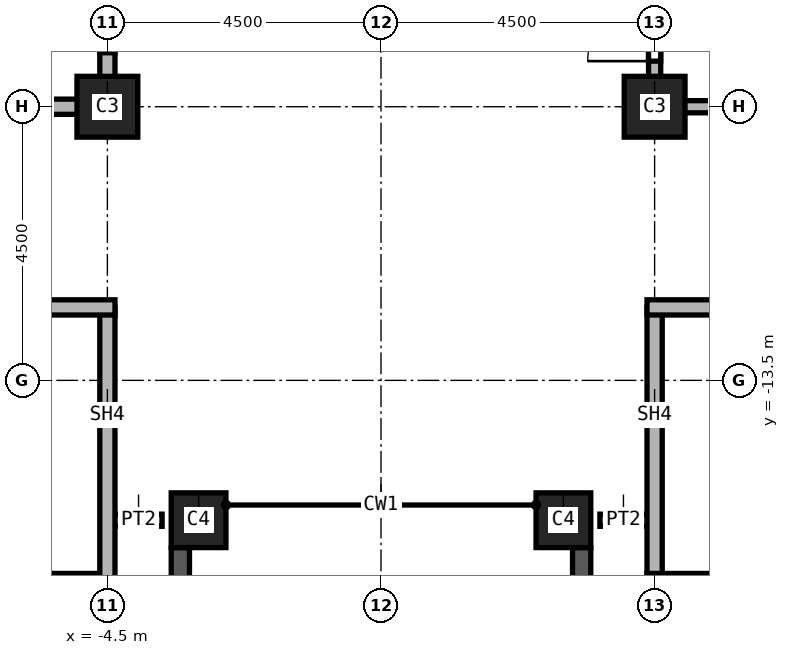
"""IFC4 building model, lengths in metres.
Left out: names, types, materials, properties, quantities, classifications, styles, units other than length and angle.
Written with IfcOpenShell. Run it as: python <this file> out.ifc"""

import sys

from ifc_helpers import new_model, si_unit, direction, frame, frame_2d, origin, origin_2d, place, context, subcontext, project, spatial, rectangle, extrude, element, fill, save


model = new_model("IFC4")
c1 = context("Model", 3, precision=1e-05, world=origin(), true_north=direction((0.0, 1.0)))
c2 = subcontext(c1, "Body", "Model", "MODEL_VIEW")
j1 = project(units=[si_unit("LENGTHUNIT", "METRE"), si_unit("PLANEANGLEUNIT", "RADIAN")], contexts=[c1])
p1 = place(None, origin())
s1 = spatial("IfcSite", under=j1, at=p1, CompositionType="ELEMENT")
p2 = place(p1, origin())
s2 = spatial("IfcBuilding", under=s1, at=p2, CompositionType="ELEMENT")
p3 = place(p2, frame((0.0, 0.0, 108.0)))
s3 = spatial("IfcBuildingStorey", under=s2, at=p3, CompositionType="ELEMENT", Elevation=108.0)
for number, where, z_axis, x_axis in (
    (1, (4.5, -9.0, 0.0), (0.0, 0.0, 1.0), (1.0, 0.0, 0.0)),
    (2, (-4.5, -9.0, 0.0), (0.0, 0.0, 1.0), (1.0, 0.0, 0.0)),
):
    element("IfcColumn", number, at=place(p3, frame(where, z_axis=z_axis, x_axis=x_axis)), inside=s3, PredefinedType="COLUMN", context=c2, shape_type="SweptSolid", body=[
        extrude(rectangle(XDim=1.0, YDim=1.0, at=origin_2d()), origin(), (0.0, 0.0, 1.0), 3.7),
    ])
for number, where, z_axis, x_axis in (
    (3, (3.0, -15.8, 0.0), (0.0, 0.0, 1.0), (1.0, 0.0, 0.0)),
    (4, (-3.0, -15.8, 0.0), (0.0, 0.0, 1.0), (1.0, 0.0, 0.0)),
):
    element("IfcColumn", number, at=place(p3, frame(where, z_axis=z_axis, x_axis=x_axis)), inside=s3, PredefinedType="COLUMN", context=c2, shape_type="SweptSolid", body=[
        extrude(rectangle(XDim=0.9, YDim=0.9, at=origin_2d()), origin(), (0.0, 0.0, 1.0), 3.7),
    ])
p4 = place(p3, frame((-3.3, -24.2, 0.0), z_axis=(0.0, 0.0, 1.0), x_axis=(0.0, 1.0, 0.0)))
e5 = element("IfcWall", 5, at=p4, inside=s3, PredefinedType="SOLIDWALL", context=c2, shape_type="SweptSolid", body=[
    extrude(rectangle(XDim=7.95, YDim=0.3, at=frame_2d((3.975, 0.0))), origin(), (0.0, 0.0, 1.0), 3.1),
])
p5 = place(p4, frame((0.788, 0.0, 0.8)))
e6 = element("IfcOpeningElement", 6, at=p5, cuts=e5, PredefinedType="OPENING", context=c2, shape_type="SweptSolid", body=[
    extrude(rectangle(XDim=2.4, YDim=1.95, at=frame_2d((1.2, 0.975))), frame((0.0, 0.15, 0.0), z_axis=(0.0, -1.0, 0.0), x_axis=(1.0, 0.0, 0.0)), (0.0, 0.0, 1.0), 0.3),
])
p6 = place(p4, frame((4.762, 0.0, 0.8)))
e7 = element("IfcOpeningElement", 7, at=p6, cuts=e5, PredefinedType="OPENING", context=c2, shape_type="SweptSolid", body=[
    extrude(rectangle(XDim=2.4, YDim=1.95, at=frame_2d((1.2, 0.975))), frame((0.0, 0.15, 0.0), z_axis=(0.0, -1.0, 0.0), x_axis=(1.0, 0.0, 0.0)), (0.0, 0.0, 1.0), 0.3),
])
p7 = place(p3, frame((3.3, -16.25, 0.0), z_axis=(0.0, 0.0, 1.0), x_axis=(0.0, -1.0, 0.0)))
e8 = element("IfcWall", 8, at=p7, inside=s3, PredefinedType="SOLIDWALL", context=c2, shape_type="SweptSolid", body=[
    extrude(rectangle(XDim=7.95, YDim=0.3, at=frame_2d((3.975, 0.0))), origin(), (0.0, 0.0, 1.0), 3.1),
])
p8 = place(p7, frame((0.788, 0.0, 0.8)))
e9 = element("IfcOpeningElement", 9, at=p8, cuts=e8, PredefinedType="OPENING", context=c2, shape_type="SweptSolid", body=[
    extrude(rectangle(XDim=2.4, YDim=1.95, at=frame_2d((1.2, 0.975))), frame((0.0, 0.15, 0.0), z_axis=(0.0, -1.0, 0.0), x_axis=(1.0, 0.0, 0.0)), (0.0, 0.0, 1.0), 0.3),
])
p9 = place(p7, frame((4.762, 0.0, 0.8)))
e10 = element("IfcOpeningElement", 10, at=p9, cuts=e8, PredefinedType="OPENING", context=c2, shape_type="SweptSolid", body=[
    extrude(rectangle(XDim=2.4, YDim=1.95, at=frame_2d((1.2, 0.975))), frame((0.0, 0.15, 0.0), z_axis=(0.0, -1.0, 0.0), x_axis=(1.0, 0.0, 0.0)), (0.0, 0.0, 1.0), 0.3),
])
for number, where, z_axis, x_axis in (
    (11, (-3.6, -15.8, 0.0), (0.0, 0.0, 1.0), (-1.0, 0.0, 0.0)),
    (12, (4.5, -15.8, 0.0), (0.0, 0.0, 1.0), (-1.0, 0.0, 0.0)),
):
    element("IfcWall", number, at=place(p3, frame(where, z_axis=z_axis, x_axis=x_axis)), inside=s3, PredefinedType="PARTITIONING", context=c2, shape_type="SweptSolid", body=[
        extrude(rectangle(XDim=0.9, YDim=0.2, at=frame_2d((0.45, 0.0))), origin(), (0.0, 0.0, 1.0), 3.7),
    ])
p10 = place(p3, frame((4.5, -9.1, 0.0), z_axis=(0.0, 0.0, 1.0), x_axis=(0.0, 1.0, 0.0)))
e13 = element("IfcWall", 13, at=p10, inside=s3, PredefinedType="SOLIDWALL", context=c2, shape_type="SweptSolid", body=[
    extrude(rectangle(XDim=9.1, YDim=0.2, at=frame_2d((4.55, 0.0))), origin(), (0.0, 0.0, 1.0), 2.938),
])
p11 = place(p10, frame((0.85, 0.0, 0.0)))
e14 = element("IfcOpeningElement", 14, at=p11, cuts=e13, PredefinedType="OPENING", context=c2, shape_type="SweptSolid", body=[
    extrude(rectangle(XDim=1.1, YDim=2.1, at=frame_2d((0.55, 1.05))), frame((0.0, 0.1, 0.0), z_axis=(0.0, -1.0, 0.0), x_axis=(1.0, 0.0, 0.0)), (0.0, 0.0, 1.0), 0.2),
])
p12 = place(p10, frame((3.35, 0.0, 0.0)))
e15 = element("IfcOpeningElement", 15, at=p12, cuts=e13, PredefinedType="OPENING", context=c2, shape_type="SweptSolid", body=[
    extrude(rectangle(XDim=1.1, YDim=2.1, at=frame_2d((0.55, 1.05))), frame((0.0, 0.1, 0.0), z_axis=(0.0, -1.0, 0.0), x_axis=(1.0, 0.0, 0.0)), (0.0, 0.0, 1.0), 0.2),
])
p13 = place(p3, frame((7.5, -9.0, 0.0), z_axis=(0.0, 0.0, 1.0), x_axis=(-1.0, 0.0, 0.0)))
e16 = element("IfcWall", 16, at=p13, inside=s3, PredefinedType="SOLIDWALL", context=c2, shape_type="SweptSolid", body=[
    extrude(rectangle(XDim=3.0, YDim=0.2, at=frame_2d((1.5, 0.0))), origin(), (0.0, 0.0, 1.0), 2.938),
])
p14 = place(p3, frame((-4.5, -9.0, 0.0), z_axis=(0.0, 0.0, 1.0), x_axis=(-1.0, 0.0, 0.0)))
e17 = element("IfcWall", 17, at=p14, inside=s3, PredefinedType="SOLIDWALL", context=c2, shape_type="SweptSolid", body=[
    extrude(rectangle(XDim=3.0, YDim=0.25, at=frame_2d((1.5, 0.0))), origin(), (0.0, 0.0, 1.0), 2.938),
])
p15 = place(p3, frame((-4.5, 0.0, 0.0), z_axis=(0.0, 0.0, 1.0), x_axis=(0.0, -1.0, 0.0)))
e18 = element("IfcWall", 18, at=p15, inside=s3, PredefinedType="SOLIDWALL", context=c2, shape_type="SweptSolid", body=[
    extrude(rectangle(XDim=9.125, YDim=0.25, at=frame_2d((4.562, 0.0))), origin(), (0.0, 0.0, 1.0), 2.938),
])
p16 = place(p15, frame((7.012, 0.0, 0.0)))
e19 = element("IfcOpeningElement", 19, at=p16, cuts=e18, PredefinedType="OPENING", context=c2, shape_type="SweptSolid", body=[
    extrude(rectangle(XDim=1.1, YDim=2.1, at=frame_2d((0.55, 1.05))), frame((0.0, 0.125, 0.0), z_axis=(0.0, -1.0, 0.0), x_axis=(1.0, 0.0, 0.0)), (0.0, 0.0, 1.0), 0.25),
])
p17 = place(p15, frame((3.95, 0.0, 0.0)))
e20 = element("IfcOpeningElement", 20, at=p17, cuts=e18, PredefinedType="OPENING", context=c2, shape_type="SweptSolid", body=[
    extrude(rectangle(XDim=1.1, YDim=2.1, at=frame_2d((0.55, 1.05))), frame((0.0, 0.125, 0.0), z_axis=(0.0, -1.0, 0.0), x_axis=(1.0, 0.0, 0.0)), (0.0, 0.0, 1.0), 0.25),
])
p18 = place(p15, frame((0.95, 0.0, 0.0)))
e21 = element("IfcOpeningElement", 21, at=p18, cuts=e18, PredefinedType="OPENING", context=c2, shape_type="SweptSolid", body=[
    extrude(rectangle(XDim=1.1, YDim=2.1, at=frame_2d((0.55, 1.05))), frame((0.0, 0.125, 0.0), z_axis=(0.0, -1.0, 0.0), x_axis=(1.0, 0.0, 0.0)), (0.0, 0.0, 1.0), 0.25),
])
p19 = place(p3, frame((-4.5, -16.8, 0.0), z_axis=(0.0, 0.0, 1.0), x_axis=(-1.0, 0.0, 0.0)))
e22 = element("IfcWall", 22, at=p19, inside=s3, PredefinedType="SOLIDWALL", context=c2, shape_type="SweptSolid", body=[
    extrude(rectangle(XDim=9.0, YDim=0.25, at=frame_2d((4.5, 0.0))), origin(), (0.0, 0.0, 1.0), 3.7),
])
p20 = place(p3, frame((-4.5, -12.3, 0.0), z_axis=(0.0, 0.0, 1.0), x_axis=(0.0, -1.0, 0.0)))
e23 = element("IfcWall", 23, at=p20, inside=s3, PredefinedType="SOLIDWALL", context=c2, shape_type="SweptSolid", body=[
    extrude(rectangle(XDim=4.625, YDim=0.25, at=frame_2d((2.312, 0.0))), origin(), (0.0, 0.0, 1.0), 3.7),
])
p21 = place(p3, frame((-4.375, -12.3, 0.0), z_axis=(0.0, 0.0, 1.0), x_axis=(-1.0, 0.0, 0.0)))
e24 = element("IfcWall", 24, at=p21, inside=s3, PredefinedType="SOLIDWALL", context=c2, shape_type="SweptSolid", body=[
    extrude(rectangle(XDim=9.125, YDim=0.25, at=frame_2d((4.562, 0.0))), origin(), (0.0, 0.0, 1.0), 3.7),
])
p22 = place(p21, frame((7.2, 0.0, 0.0)))
e25 = element("IfcOpeningElement", 25, at=p22, cuts=e24, PredefinedType="OPENING", context=c2, shape_type="SweptSolid", body=[
    extrude(rectangle(XDim=1.2, YDim=2.1, at=frame_2d((0.6, 1.05))), frame((0.0, 0.125, 0.0), z_axis=(0.0, -1.0, 0.0), x_axis=(1.0, 0.0, 0.0)), (0.0, 0.0, 1.0), 0.25),
])
p23 = place(p3, frame((4.5, -16.8, 0.0), z_axis=(0.0, 0.0, 1.0), x_axis=(0.0, 1.0, 0.0)))
e26 = element("IfcWall", 26, at=p23, inside=s3, PredefinedType="SOLIDWALL", context=c2, shape_type="SweptSolid", body=[
    extrude(rectangle(XDim=4.5, YDim=0.25, at=frame_2d((2.25, 0.0))), origin(), (0.0, 0.0, 1.0), 3.7),
])
p24 = place(p3, frame((13.5, -16.8, 0.0), z_axis=(0.0, 0.0, 1.0), x_axis=(-1.0, 0.0, 0.0)))
e27 = element("IfcWall", 27, at=p24, inside=s3, PredefinedType="SOLIDWALL", context=c2, shape_type="SweptSolid", body=[
    extrude(rectangle(XDim=9.125, YDim=0.25, at=frame_2d((4.562, 0.0))), origin(), (0.0, 0.0, 1.0), 3.7),
])
p25 = place(p3, frame((13.5, -12.3, 0.0), z_axis=(0.0, 0.0, 1.0), x_axis=(-1.0, 0.0, 0.0)))
e28 = element("IfcWall", 28, at=p25, inside=s3, PredefinedType="SOLIDWALL", context=c2, shape_type="SweptSolid", body=[
    extrude(rectangle(XDim=9.125, YDim=0.25, at=frame_2d((4.562, 0.0))), origin(), (0.0, 0.0, 1.0), 3.7),
])
p26 = place(p25, frame((0.6, 0.0, 0.0)))
e29 = element("IfcOpeningElement", 29, at=p26, cuts=e28, PredefinedType="OPENING", context=c2, shape_type="SweptSolid", body=[
    extrude(rectangle(XDim=1.2, YDim=2.1, at=frame_2d((0.6, 1.05))), frame((0.0, 0.125, 0.0), z_axis=(0.0, -1.0, 0.0), x_axis=(1.0, 0.0, 0.0)), (0.0, 0.0, 1.0), 0.25),
])
p27 = place(p11, origin())
e30 = element("IfcDoor", 30, at=p27, inside=s3, OperationType="SINGLE_SWING_LEFT", PredefinedType="DOOR", context=c2, shape_type="SweptSolid", body=[
    extrude(rectangle(XDim=1.1, YDim=2.1, at=frame_2d((0.55, 1.05))), frame((0.0, 0.025, 0.0), z_axis=(0.0, -1.0, 0.0), x_axis=(1.0, 0.0, 0.0)), (0.0, 0.0, 1.0), 0.05),
])
fill(e14, e30)
p28 = place(p16, origin())
e31 = element("IfcDoor", 31, at=p28, inside=s3, OperationType="SLIDING_TO_LEFT", PredefinedType="DOOR", context=c2, shape_type="SweptSolid", body=[
    extrude(rectangle(XDim=1.1, YDim=2.1, at=frame_2d((0.55, 1.05))), frame((0.0, 0.025, 0.0), z_axis=(0.0, -1.0, 0.0), x_axis=(1.0, 0.0, 0.0)), (0.0, 0.0, 1.0), 0.05),
])
fill(e19, e31)
save(model, sys.argv[1])
